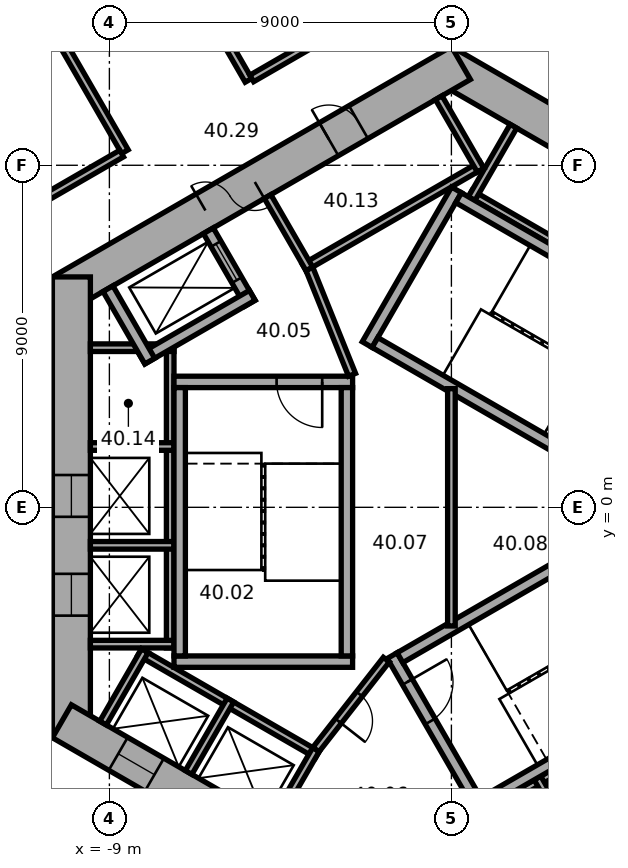
"""IFC4 building model, lengths in metres.
Left out: names, types, materials, properties, quantities, classifications, styles, units other than length and angle.
Written with IfcOpenShell. Run it as: python <this file> out.ifc"""

import sys

from ifc_helpers import new_model, si_unit, direction, frame, frame_2d, origin, place, context, subcontext, project, spatial, rectangle, extrude, element, fill, save


model = new_model("IFC4")
c1 = context("Model", 3, precision=1e-05, world=origin(), true_north=direction((0.0, 1.0)))
c2 = subcontext(c1, "Body", "Model", "MODEL_VIEW")
j1 = project(units=[si_unit("LENGTHUNIT", "METRE"), si_unit("PLANEANGLEUNIT", "RADIAN")], contexts=[c1])
p1 = place(None, origin())
s1 = spatial("IfcSite", under=j1, at=p1, CompositionType="ELEMENT")
p2 = place(p1, origin())
s2 = spatial("IfcBuilding", under=s1, at=p2, CompositionType="ELEMENT")
p3 = place(p2, frame((0.0, 0.0, 165.1)))
s3 = spatial("IfcBuildingStorey", under=s2, at=p3, CompositionType="ELEMENT", Elevation=165.1)
p4 = place(p3, frame((10.25, 5.629, 0.0), z_axis=(0.0, 0.0, 1.0), x_axis=(-0.866022616891, 0.50000482701, 0.0)))
e1 = element("IfcWall", 1, at=p4, inside=s3, PredefinedType="SHEAR", context=c2, shape_type="SweptSolid", body=[
    extrude(rectangle(XDim=12.125, YDim=1.0, at=frame_2d((6.062, 0.0))), origin(), (0.0, 0.0, 1.0), 3.7),
])
p5 = place(p4, frame((2.712, 0.0, 0.0)))
e2 = element("IfcOpeningElement", 2, at=p5, cuts=e1, PredefinedType="OPENING", context=c2, shape_type="SweptSolid", body=[
    extrude(rectangle(XDim=0.9, YDim=2.1, at=frame_2d((0.45, 1.05))), frame((0.0, 0.51, 0.0), z_axis=(0.0, -1.0, 0.0), x_axis=(1.0, 0.0, 0.0)), (0.0, 0.0, 1.0), 1.02),
])
p6 = place(p4, frame((6.612, 0.0, 0.0)))
e3 = element("IfcOpeningElement", 3, at=p6, cuts=e1, PredefinedType="OPENING", context=c2, shape_type="SweptSolid", body=[
    extrude(rectangle(XDim=0.9, YDim=2.1, at=frame_2d((0.45, 1.05))), frame((0.0, 0.51, 0.0), z_axis=(0.0, -1.0, 0.0), x_axis=(1.0, 0.0, 0.0)), (0.0, 0.0, 1.0), 1.02),
])
p7 = place(p3, frame((0.25, 11.691, 0.0), z_axis=(0.0, 0.0, 1.0), x_axis=(-0.866022616891, -0.50000482701, 0.0)))
e4 = element("IfcWall", 4, at=p7, inside=s3, PredefinedType="SHEAR", context=c2, shape_type="SweptSolid", body=[
    extrude(rectangle(XDim=12.125, YDim=1.0, at=frame_2d((6.062, 0.0))), origin(), (0.0, 0.0, 1.0), 3.7),
])
p8 = place(p7, frame((6.262, 0.0, 0.0)))
e5 = element("IfcOpeningElement", 5, at=p8, cuts=e4, PredefinedType="OPENING", context=c2, shape_type="SweptSolid", body=[
    extrude(rectangle(XDim=1.5, YDim=2.1, at=frame_2d((0.75, 1.05))), frame((0.0, 0.51, 0.0), z_axis=(0.0, -1.0, 0.0), x_axis=(1.0, 0.0, 0.0)), (0.0, 0.0, 1.0), 1.02),
])
p9 = place(p7, frame((3.112, 0.0, 0.0)))
e6 = element("IfcOpeningElement", 6, at=p9, cuts=e4, PredefinedType="OPENING", context=c2, shape_type="SweptSolid", body=[
    extrude(rectangle(XDim=0.9, YDim=2.1, at=frame_2d((0.45, 1.05))), frame((0.0, 0.51, 0.0), z_axis=(0.0, -1.0, 0.0), x_axis=(1.0, 0.0, 0.0)), (0.0, 0.0, 1.0), 1.02),
])
p10 = place(p3, frame((-10.0, 6.062, 0.0), z_axis=(0.0, 0.0, 1.0), x_axis=(0.0, -1.0, 0.0)))
e7 = element("IfcWall", 7, at=p10, inside=s3, PredefinedType="SHEAR", context=c2, shape_type="SweptSolid", body=[
    extrude(rectangle(XDim=12.125, YDim=1.0, at=frame_2d((6.062, 0.0))), origin(), (0.0, 0.0, 1.0), 3.7),
])
p11 = place(p10, frame((5.212, 0.0, 0.0)))
e8 = element("IfcOpeningElement", 8, at=p11, cuts=e7, PredefinedType="OPENING", context=c2, shape_type="SweptSolid", body=[
    extrude(rectangle(XDim=1.1, YDim=2.1, at=frame_2d((0.55, 1.05))), frame((0.0, 0.51, 0.0), z_axis=(0.0, -1.0, 0.0), x_axis=(1.0, 0.0, 0.0)), (0.0, 0.0, 1.0), 1.02),
])
p12 = place(p10, frame((7.812, 0.0, 0.0)))
e9 = element("IfcOpeningElement", 9, at=p12, cuts=e7, PredefinedType="OPENING", context=c2, shape_type="SweptSolid", body=[
    extrude(rectangle(XDim=1.1, YDim=2.1, at=frame_2d((0.55, 1.05))), frame((0.0, 0.51, 0.0), z_axis=(0.0, -1.0, 0.0), x_axis=(1.0, 0.0, 0.0)), (0.0, 0.0, 1.0), 1.02),
])
p13 = place(p3, frame((-10.25, -5.629, 0.0), z_axis=(0.0, 0.0, 1.0), x_axis=(0.866022616891, -0.50000482701, 0.0)))
e10 = element("IfcWall", 10, at=p13, inside=s3, PredefinedType="SHEAR", context=c2, shape_type="SweptSolid", body=[
    extrude(rectangle(XDim=12.125, YDim=1.0, at=frame_2d((6.062, 0.0))), origin(), (0.0, 0.0, 1.0), 3.7),
])
p14 = place(p13, frame((6.262, 0.0, 0.0)))
e11 = element("IfcOpeningElement", 11, at=p14, cuts=e10, PredefinedType="OPENING", context=c2, shape_type="SweptSolid", body=[
    extrude(rectangle(XDim=1.5, YDim=2.1, at=frame_2d((0.75, 1.05))), frame((0.0, 0.51, 0.0), z_axis=(0.0, -1.0, 0.0), x_axis=(1.0, 0.0, 0.0)), (0.0, 0.0, 1.0), 1.02),
])
p15 = place(p13, frame((1.712, 0.0, 0.0)))
e12 = element("IfcOpeningElement", 12, at=p15, cuts=e10, PredefinedType="OPENING", context=c2, shape_type="SweptSolid", body=[
    extrude(rectangle(XDim=1.1, YDim=2.1, at=frame_2d((0.55, 1.05))), frame((0.0, 0.51, 0.0), z_axis=(0.0, -1.0, 0.0), x_axis=(1.0, 0.0, 0.0)), (0.0, 0.0, 1.0), 1.02),
])
p16 = place(p13, frame((4.312, 0.0, 0.0)))
e13 = element("IfcOpeningElement", 13, at=p16, cuts=e10, PredefinedType="OPENING", context=c2, shape_type="SweptSolid", body=[
    extrude(rectangle(XDim=1.1, YDim=2.1, at=frame_2d((0.55, 1.05))), frame((0.0, 0.51, 0.0), z_axis=(0.0, -1.0, 0.0), x_axis=(1.0, 0.0, 0.0)), (0.0, 0.0, 1.0), 1.02),
])
p17 = place(p3, frame((-0.25, -11.691, 0.0), z_axis=(0.0, 0.0, 1.0), x_axis=(0.866022616891, 0.50000482701, 0.0)))
e14 = element("IfcWall", 14, at=p17, inside=s3, PredefinedType="SHEAR", context=c2, shape_type="SweptSolid", body=[
    extrude(rectangle(XDim=12.125, YDim=1.0, at=frame_2d((6.062, 0.0))), origin(), (0.0, 0.0, 1.0), 3.7),
])
p18 = place(p17, frame((2.612, 0.0, 0.0)))
e15 = element("IfcOpeningElement", 15, at=p18, cuts=e14, PredefinedType="OPENING", context=c2, shape_type="SweptSolid", body=[
    extrude(rectangle(XDim=1.1, YDim=2.1, at=frame_2d((0.55, 1.05))), frame((0.0, 0.51, 0.0), z_axis=(0.0, -1.0, 0.0), x_axis=(1.0, 0.0, 0.0)), (0.0, 0.0, 1.0), 1.02),
])
p19 = place(p17, frame((5.212, 0.0, 0.0)))
e16 = element("IfcOpeningElement", 16, at=p19, cuts=e14, PredefinedType="OPENING", context=c2, shape_type="SweptSolid", body=[
    extrude(rectangle(XDim=1.1, YDim=2.1, at=frame_2d((0.55, 1.05))), frame((0.0, 0.51, 0.0), z_axis=(0.0, -1.0, 0.0), x_axis=(1.0, 0.0, 0.0)), (0.0, 0.0, 1.0), 1.02),
])
p20 = place(p17, frame((7.812, 0.0, 0.0)))
e17 = element("IfcOpeningElement", 17, at=p20, cuts=e14, PredefinedType="OPENING", context=c2, shape_type="SweptSolid", body=[
    extrude(rectangle(XDim=1.1, YDim=2.1, at=frame_2d((0.55, 1.05))), frame((0.0, 0.51, 0.0), z_axis=(0.0, -1.0, 0.0), x_axis=(1.0, 0.0, 0.0)), (0.0, 0.0, 1.0), 1.02),
])
p21 = place(p3, frame((7.424, 4.259, 0.0), z_axis=(0.0, 0.0, 1.0), x_axis=(-0.866026010844, 0.49999894854, 0.0)))
e18 = element("IfcWall", 18, at=p21, inside=s3, PredefinedType="PARTITIONING", context=c2, shape_type="SweptSolid", body=[
    extrude(rectangle(XDim=8.0, YDim=0.2, at=frame_2d((4.0, 0.0))), origin(), (0.0, 0.0, 1.0), 3.42),
])
p22 = place(p3, frame((0.532, 8.122, 0.0), z_axis=(0.0, 0.0, 1.0), x_axis=(0.500077893725, 0.86598042715, 0.0)))
e19 = element("IfcWall", 19, at=p22, inside=s3, PredefinedType="PARTITIONING", context=c2, shape_type="SweptSolid", body=[
    extrude(rectangle(XDim=2.2, YDim=0.2, at=frame_2d((1.1, 0.0))), origin(), (0.0, 0.0, 1.0), 3.42),
])
p23 = place(p3, frame((0.803, 9.009, 0.0), z_axis=(0.0, 0.0, 1.0), x_axis=(-0.866028230842, -0.499995103361, 0.0)))
e20 = element("IfcWall", 20, at=p23, inside=s3, PredefinedType="PARTITIONING", context=c2, shape_type="SweptSolid", body=[
    extrude(rectangle(XDim=5.4, YDim=0.2, at=frame_2d((2.7, 0.0))), origin(), (0.0, 0.0, 1.0), 3.42),
])
p24 = place(p3, frame((0.767, 8.872, 0.0), z_axis=(0.0, 0.0, 1.0), x_axis=(-0.499994660107, 0.866028486751, 0.0)))
e21 = element("IfcWall", 21, at=p24, inside=s3, PredefinedType="PARTITIONING", context=c2, shape_type="SweptSolid", body=[
    extrude(rectangle(XDim=2.2, YDim=0.2, at=frame_2d((1.1, 0.0))), origin(), (0.0, 0.0, 1.0), 3.42),
])
p25 = place(p3, frame((-3.737, 6.272, 0.0), z_axis=(0.0, 0.0, 1.0), x_axis=(-0.50002983664, 0.866008176907, 0.0)))
e22 = element("IfcWall", 22, at=p25, inside=s3, PredefinedType="PARTITIONING", context=c2, shape_type="SweptSolid", body=[
    extrude(rectangle(XDim=2.2, YDim=0.2, at=frame_2d((1.1, 0.0))), origin(), (0.0, 0.0, 1.0), 3.42),
])
p26 = place(p3, frame((-7.4, 4.3, 0.0), z_axis=(0.0, 0.0, 1.0), x_axis=(0.0, -1.0, 0.0)))
e23 = element("IfcWall", 23, at=p26, inside=s3, PredefinedType="PARTITIONING", context=c2, shape_type="SweptSolid", body=[
    extrude(rectangle(XDim=8.0, YDim=0.2, at=frame_2d((4.0, 0.0))), origin(), (0.0, 0.0, 1.0), 3.42),
])
for number, where, z_axis, x_axis in (
    (24, (-7.3, 4.2, 0.0), (0.0, 0.0, 1.0), (-1.0, 0.0, 0.0)),
    (25, (-7.3, 1.6, 0.0), (0.0, 0.0, 1.0), (-1.0, 0.0, 0.0)),
    (26, (-7.3, -1.0, 0.0), (0.0, 0.0, 1.0), (-1.0, 0.0, 0.0)),
    (27, (-7.3, -3.6, 0.0), (0.0, 0.0, 1.0), (-1.0, 0.0, 0.0)),
):
    element("IfcWall", number, at=place(p3, frame(where, z_axis=z_axis, x_axis=x_axis)), inside=s3, PredefinedType="PARTITIONING", context=c2, shape_type="SweptSolid", body=[
        extrude(rectangle(XDim=2.2, YDim=0.2, at=frame_2d((1.1, 0.0))), origin(), (0.0, 0.0, 1.0), 3.42),
    ])
p27 = place(p3, frame((-8.203, -3.809, 0.0), z_axis=(0.0, 0.0, 1.0), x_axis=(0.866028230842, -0.499995103361, 0.0)))
e28 = element("IfcWall", 28, at=p27, inside=s3, PredefinedType="PARTITIONING", context=c2, shape_type="SweptSolid", body=[
    extrude(rectangle(XDim=5.4, YDim=0.2, at=frame_2d((2.7, 0.0))), origin(), (0.0, 0.0, 1.0), 3.42),
])
for number, where, z_axis, x_axis in (
    (29, (-8.067, -3.772, 0.0), (0.0, 0.0, 1.0), (-0.5, -0.866, 0.0)),
    (30, (-5.815, -5.072, 0.0), (0.0, 0.0, 1.0), (-0.5, -0.866, 0.0)),
):
    element("IfcWall", number, at=place(p3, frame(where, z_axis=z_axis, x_axis=x_axis)), inside=s3, PredefinedType="PARTITIONING", context=c2, shape_type="SweptSolid", body=[
        extrude(rectangle(XDim=2.2, YDim=0.2, at=frame_2d((1.1, 0.0))), origin(), (0.0, 0.0, 1.0), 3.42),
    ])
p28 = place(p3, frame((-3.563, -6.372, 0.0), z_axis=(0.0, 0.0, 1.0), x_axis=(-0.499994660107, -0.866028486751, 0.0)))
e31 = element("IfcWall", 31, at=p28, inside=s3, PredefinedType="PARTITIONING", context=c2, shape_type="SweptSolid", body=[
    extrude(rectangle(XDim=2.2, YDim=0.2, at=frame_2d((1.1, 0.0))), origin(), (0.0, 0.0, 1.0), 3.42),
])
p29 = place(p3, frame((-0.024, -8.559, 0.0), z_axis=(0.0, 0.0, 1.0), x_axis=(0.866026010844, 0.49999894854, 0.0)))
e32 = element("IfcWall", 32, at=p29, inside=s3, PredefinedType="PARTITIONING", context=c2, shape_type="SweptSolid", body=[
    extrude(rectangle(XDim=8.0, YDim=0.2, at=frame_2d((4.0, 0.0))), origin(), (0.0, 0.0, 1.0), 3.42),
])
p30 = place(p3, frame((2.264, -7.122, 0.0), z_axis=(0.0, 0.0, 1.0), x_axis=(0.500077893725, -0.86598042715, 0.0)))
e33 = element("IfcWall", 33, at=p30, inside=s3, PredefinedType="PARTITIONING", context=c2, shape_type="SweptSolid", body=[
    extrude(rectangle(XDim=2.2, YDim=0.2, at=frame_2d((1.1, 0.0))), origin(), (0.0, 0.0, 1.0), 3.42),
])
p31 = place(p3, frame((-2.216, 4.282, 0.0), z_axis=(0.0, 0.0, 1.0), x_axis=(0.499977259774, 0.866038532462, 0.0)))
e34 = element("IfcWall", 34, at=p31, inside=s3, PredefinedType="SHEAR", context=c2, shape_type="SweptSolid", body=[
    extrude(rectangle(XDim=4.7, YDim=0.3, at=frame_2d((2.35, 0.0))), origin(), (0.0, 0.0, 1.0), 3.42),
])
for number, where, z_axis, x_axis in (
    (35, (4.103, 0.807, 0.0), (0.0, 0.0, 1.0), (-0.866, 0.5, 0.0)),
    (36, (6.303, 4.617, 0.0), (0.0, 0.0, 1.0), (-0.866, 0.5, 0.0)),
):
    element("IfcWall", number, at=place(p3, frame(where, z_axis=z_axis, x_axis=x_axis)), inside=s3, PredefinedType="SHEAR", context=c2, shape_type="SweptSolid", body=[
        extrude(rectangle(XDim=7.06, YDim=0.3, at=frame_2d((3.53, 0.0))), origin(), (0.0, 0.0, 1.0), 3.42),
    ])
p32 = place(p3, frame((-2.6, 3.3, 0.0), z_axis=(0.0, 0.0, 1.0), x_axis=(-1.0, 0.0, 0.0)))
e37 = element("IfcWall", 37, at=p32, inside=s3, PredefinedType="SHEAR", context=c2, shape_type="SweptSolid", body=[
    extrude(rectangle(XDim=4.7, YDim=0.3, at=frame_2d((2.35, 0.0))), origin(), (0.0, 0.0, 1.0), 3.42),
])
p33 = place(p32, frame((0.8, 0.0, 0.0)))
e38 = element("IfcOpeningElement", 38, at=p33, cuts=e37, PredefinedType="OPENING", context=c2, shape_type="SweptSolid", body=[
    extrude(rectangle(XDim=1.2, YDim=2.1, at=frame_2d((0.6, 1.05))), frame((0.0, 0.16, 0.0), z_axis=(0.0, -1.0, 0.0), x_axis=(1.0, 0.0, 0.0)), (0.0, 0.0, 1.0), 0.32),
])
p34 = place(p3, frame((-2.6, -4.06, 0.0), z_axis=(0.0, 0.0, 1.0), x_axis=(-1.0, 0.0, 0.0)))
e39 = element("IfcWall", 39, at=p34, inside=s3, PredefinedType="SHEAR", context=c2, shape_type="SweptSolid", body=[
    extrude(rectangle(XDim=4.7, YDim=0.3, at=frame_2d((2.35, 0.0))), origin(), (0.0, 0.0, 1.0), 3.42),
])
for number, where, z_axis, x_axis in (
    (40, (-2.75, 3.15, 0.0), (0.0, 0.0, 1.0), (0.0, -1.0, 0.0)),
    (41, (-7.15, 3.15, 0.0), (0.0, 0.0, 1.0), (0.0, -1.0, 0.0)),
):
    element("IfcWall", number, at=place(p3, frame(where, z_axis=z_axis, x_axis=x_axis)), inside=s3, PredefinedType="SHEAR", context=c2, shape_type="SweptSolid", body=[
        extrude(rectangle(XDim=7.06, YDim=0.3, at=frame_2d((3.53, 0.0))), origin(), (0.0, 0.0, 1.0), 3.42),
    ])
p35 = place(p3, frame((-1.558, -3.902, 0.0), z_axis=(0.0, 0.0, 1.0), x_axis=(0.499977259774, -0.866038532462, 0.0)))
e42 = element("IfcWall", 42, at=p35, inside=s3, PredefinedType="SHEAR", context=c2, shape_type="SweptSolid", body=[
    extrude(rectangle(XDim=4.7, YDim=0.3, at=frame_2d((2.35, 0.0))), origin(), (0.0, 0.0, 1.0), 3.42),
])
p36 = place(p35, frame((0.8, 0.0, 0.0)))
e43 = element("IfcOpeningElement", 43, at=p36, cuts=e42, PredefinedType="OPENING", context=c2, shape_type="SweptSolid", body=[
    extrude(rectangle(XDim=1.2, YDim=2.1, at=frame_2d((0.6, 1.05))), frame((0.0, 0.16, 0.0), z_axis=(0.0, -1.0, 0.0), x_axis=(1.0, 0.0, 0.0)), (0.0, 0.0, 1.0), 0.32),
])
for number, where, z_axis, x_axis in (
    (44, (-1.353, -3.957, 0.0), (0.0, 0.0, 1.0), (0.866, 0.5, 0.0)),
    (45, (0.847, -7.767, 0.0), (0.0, 0.0, 1.0), (0.866, 0.5, 0.0)),
):
    element("IfcWall", number, at=place(p3, frame(where, z_axis=z_axis, x_axis=x_axis)), inside=s3, PredefinedType="SHEAR", context=c2, shape_type="SweptSolid", body=[
        extrude(rectangle(XDim=7.06, YDim=0.3, at=frame_2d((3.53, 0.0))), origin(), (0.0, 0.0, 1.0), 3.42),
    ])
p37 = place(p3, frame((-5.295, 5.372, 0.0), z_axis=(0.0, 0.0, 1.0), x_axis=(-0.500077893725, 0.86598042715, 0.0)))
e46 = element("IfcWall", 46, at=p37, inside=s3, PredefinedType="SHEAR", context=c2, shape_type="SweptSolid", body=[
    extrude(rectangle(XDim=2.2, YDim=0.3, at=frame_2d((1.1, 0.0))), origin(), (0.0, 0.0, 1.0), 3.42),
])
p38 = place(p37, frame((0.7, 0.0, 0.0)))
e47 = element("IfcOpeningElement", 47, at=p38, cuts=e46, PredefinedType="OPENING", context=c2, shape_type="SweptSolid", body=[
    extrude(rectangle(XDim=1.1, YDim=2.1, at=frame_2d((0.55, 1.05))), frame((0.0, 0.16, 0.0), z_axis=(0.0, -1.0, 0.0), x_axis=(1.0, 0.0, 0.0)), (0.0, 0.0, 1.0), 0.32),
])
p39 = place(p3, frame((-5.24, 5.577, 0.0), z_axis=(0.0, 0.0, 1.0), x_axis=(-0.866014461049, -0.500018952895, 0.0)))
e48 = element("IfcWall", 48, at=p39, inside=s3, PredefinedType="SHEAR", context=c2, shape_type="SweptSolid", body=[
    extrude(rectangle(XDim=3.35, YDim=0.3, at=frame_2d((1.675, 0.0))), origin(), (0.0, 0.0, 1.0), 3.42),
])
p40 = place(p3, frame((-7.937, 3.847, 0.0), z_axis=(0.0, 0.0, 1.0), x_axis=(-0.50002983664, 0.866008176907, 0.0)))
e49 = element("IfcWall", 49, at=p40, inside=s3, PredefinedType="SHEAR", context=c2, shape_type="SweptSolid", body=[
    extrude(rectangle(XDim=2.2, YDim=0.3, at=frame_2d((1.1, 0.0))), origin(), (0.0, 0.0, 1.0), 3.42),
])
p41 = place(p3, frame((-2.615, 3.487, 0.0), z_axis=(0.0, 0.0, 1.0), x_axis=(-0.373576831041, 0.92759924068, 0.0)))
e50 = element("IfcWall", 50, at=p41, inside=s3, PredefinedType="PARTITIONING", context=c2, shape_type="SweptSolid", body=[
    extrude(rectangle(XDim=3.002, YDim=0.2, at=frame_2d((1.501, 0.0))), origin(), (0.0, 0.0, 1.0), 3.42),
])
p42 = place(p3, frame((-1.712, -4.008, 0.0), z_axis=(0.0, 0.0, 1.0), x_axis=(-0.616549420702, -0.787316208287, 0.0)))
e51 = element("IfcWall", 51, at=p42, inside=s3, PredefinedType="PARTITIONING", context=c2, shape_type="SweptSolid", body=[
    extrude(rectangle(XDim=3.002, YDim=0.2, at=frame_2d((1.501, 0.0))), origin(), (0.0, 0.0, 1.0), 3.42),
])
p43 = place(p42, frame((1.15, 0.0, 0.0)))
e52 = element("IfcOpeningElement", 52, at=p43, cuts=e51, PredefinedType="OPENING", context=c2, shape_type="SweptSolid", body=[
    extrude(rectangle(XDim=0.9, YDim=2.1, at=frame_2d((0.45, 1.05))), frame((0.0, 0.11, 0.0), z_axis=(0.0, -1.0, 0.0), x_axis=(1.0, 0.0, 0.0)), (0.0, 0.0, 1.0), 0.22),
])
p44 = place(p3, frame((0.0, -3.122, 0.0), z_axis=(0.0, 0.0, 1.0), x_axis=(0.0, 1.0, 0.0)))
e53 = element("IfcWall", 53, at=p44, inside=s3, PredefinedType="PARTITIONING", context=c2, shape_type="SweptSolid", body=[
    extrude(rectangle(XDim=6.245, YDim=0.2, at=frame_2d((3.122, 0.0))), origin(), (0.0, 0.0, 1.0), 3.42),
])
p45 = place(p3, frame((-12.766, 16.589, 0.0), z_axis=(0.0, 0.0, 1.0), x_axis=(0.500010139422, -0.866019549707, 0.0)))
e54 = element("IfcWall", 54, at=p45, inside=s3, PredefinedType="PARTITIONING", context=c2, shape_type="SweptSolid", body=[
    extrude(rectangle(XDim=8.35, YDim=0.2, at=frame_2d((4.175, 0.0))), origin(), (0.0, 0.0, 1.0), 3.42),
])
p46 = place(p45, frame((3.675, 0.0, 0.0)))
e55 = element("IfcOpeningElement", 55, at=p46, cuts=e54, PredefinedType="OPENING", context=c2, shape_type="SweptSolid", body=[
    extrude(rectangle(XDim=1.0, YDim=2.1, at=frame_2d((0.5, 1.05))), frame((0.0, 0.11, 0.0), z_axis=(0.0, -1.0, 0.0), x_axis=(1.0, 0.0, 0.0)), (0.0, 0.0, 1.0), 0.22),
])
p47 = place(p3, frame((-9.515, 18.466, 0.0), z_axis=(0.0, 0.0, 1.0), x_axis=(0.500010139422, -0.866019549707, 0.0)))
e56 = element("IfcWall", 56, at=p47, inside=s3, PredefinedType="PARTITIONING", context=c2, shape_type="SweptSolid", body=[
    extrude(rectangle(XDim=8.35, YDim=0.2, at=frame_2d((4.175, 0.0))), origin(), (0.0, 0.0, 1.0), 2.87),
])
p48 = place(p47, frame((3.675, 0.0, 0.0)))
e57 = element("IfcOpeningElement", 57, at=p48, cuts=e56, PredefinedType="OPENING", context=c2, shape_type="SweptSolid", body=[
    extrude(rectangle(XDim=1.0, YDim=2.1, at=frame_2d((0.5, 1.05))), frame((0.0, 0.11, 0.0), z_axis=(0.0, -1.0, 0.0), x_axis=(1.0, 0.0, 0.0)), (0.0, 0.0, 1.0), 0.22),
])
p49 = place(p3, frame((-8.678, 9.308, 0.0), z_axis=(0.0, 0.0, 1.0), x_axis=(-0.866000359435, -0.500043375578, 0.0)))
e58 = element("IfcWall", 58, at=p49, inside=s3, PredefinedType="PARTITIONING", context=c2, shape_type="SweptSolid", body=[
    extrude(rectangle(XDim=3.161, YDim=0.2, at=frame_2d((1.581, 0.0))), origin(), (0.0, 0.0, 1.0), 3.42),
])
p50 = place(p3, frame((-0.95, 13.77, 0.0), z_axis=(0.0, 0.0, 1.0), x_axis=(-0.866036689987, -0.499980451214, 0.0)))
e59 = element("IfcWall", 59, at=p50, inside=s3, PredefinedType="PARTITIONING", context=c2, shape_type="SweptSolid", body=[
    extrude(rectangle(XDim=4.969, YDim=0.2, at=frame_2d((2.485, 0.0))), origin(), (0.0, 0.0, 1.0), 3.42),
])
p51 = place(p3, frame((9.224, 8.993, 0.0), z_axis=(0.0, 0.0, 1.0), x_axis=(-0.866031754707, 0.499988999718, 0.0)))
e60 = element("IfcWall", 60, at=p51, inside=s3, PredefinedType="PARTITIONING", context=c2, shape_type="SweptSolid", body=[
    extrude(rectangle(XDim=9.514, YDim=0.2, at=frame_2d((4.757, 0.0))), origin(), (0.0, 0.0, 1.0), 3.42),
])
p52 = place(p51, frame((3.848, 0.0, 0.0)))
e61 = element("IfcOpeningElement", 61, at=p52, cuts=e60, PredefinedType="OPENING", context=c2, shape_type="SweptSolid", body=[
    extrude(rectangle(XDim=1.0, YDim=2.1, at=frame_2d((0.5, 1.05))), frame((0.0, 0.11, 0.0), z_axis=(0.0, -1.0, 0.0), x_axis=(1.0, 0.0, 0.0)), (0.0, 0.0, 1.0), 0.22),
])
p53 = place(p8, origin())
e62 = element("IfcDoor", 62, at=p53, inside=s3, OperationType="DOUBLE_DOOR_SINGLE_SWING", PredefinedType="DOOR", context=c2, shape_type="SweptSolid", body=[
    extrude(rectangle(XDim=1.5, YDim=2.1, at=frame_2d((0.75, 1.05))), frame((0.0, 0.025, 0.0), z_axis=(0.0, -1.0, 0.0), x_axis=(1.0, 0.0, 0.0)), (0.0, 0.0, 1.0), 0.05),
])
fill(e5, e62)
p54 = place(p33, origin())
e63 = element("IfcDoor", 63, at=p54, inside=s3, OperationType="SINGLE_SWING_RIGHT", PredefinedType="DOOR", context=c2, shape_type="SweptSolid", body=[
    extrude(rectangle(XDim=1.2, YDim=2.1, at=frame_2d((0.6, 1.05))), frame((0.0, 0.025, 0.0), z_axis=(0.0, -1.0, 0.0), x_axis=(1.0, 0.0, 0.0)), (0.0, 0.0, 1.0), 0.05),
])
fill(e38, e63)
p55 = place(p36, origin())
e64 = element("IfcDoor", 64, at=p55, inside=s3, OperationType="SINGLE_SWING_RIGHT", PredefinedType="DOOR", context=c2, shape_type="SweptSolid", body=[
    extrude(rectangle(XDim=1.2, YDim=2.1, at=frame_2d((0.6, 1.05))), frame((0.0, 0.025, 0.0), z_axis=(0.0, -1.0, 0.0), x_axis=(1.0, 0.0, 0.0)), (0.0, 0.0, 1.0), 0.05),
])
fill(e43, e64)
p56 = place(p43, origin())
e65 = element("IfcDoor", 65, at=p56, inside=s3, OperationType="SINGLE_SWING_LEFT", PredefinedType="DOOR", context=c2, shape_type="SweptSolid", body=[
    extrude(rectangle(XDim=0.9, YDim=2.1, at=frame_2d((0.45, 1.05))), frame((0.0, 0.025, 0.0), z_axis=(0.0, -1.0, 0.0), x_axis=(1.0, 0.0, 0.0)), (0.0, 0.0, 1.0), 0.05),
])
fill(e52, e65)
p57 = place(p9, origin())
e66 = element("IfcDoor", 66, at=p57, inside=s3, OperationType="SINGLE_SWING_LEFT", PredefinedType="DOOR", context=c2, shape_type="SweptSolid", body=[
    extrude(rectangle(XDim=0.9, YDim=2.1, at=frame_2d((0.45, 1.05))), frame((0.0, 0.025, 0.0), z_axis=(0.0, -1.0, 0.0), x_axis=(1.0, 0.0, 0.0)), (0.0, 0.0, 1.0), 0.05),
])
fill(e6, e66)
p58 = place(p38, origin())
e67 = element("IfcDoor", 67, at=p58, inside=s3, OperationType="DOUBLE_DOOR_SLIDING", PredefinedType="DOOR", context=c2, shape_type="SweptSolid", body=[
    extrude(rectangle(XDim=1.1, YDim=2.1, at=frame_2d((0.55, 1.05))), frame((0.0, 0.025, 0.0), z_axis=(0.0, -1.0, 0.0), x_axis=(1.0, 0.0, 0.0)), (0.0, 0.0, 1.0), 0.05),
])
fill(e47, e67)
p59 = place(p11, origin())
e68 = element("IfcDoor", 68, at=p59, inside=s3, OperationType="DOUBLE_DOOR_SLIDING", PredefinedType="DOOR", context=c2, shape_type="SweptSolid", body=[
    extrude(rectangle(XDim=1.1, YDim=2.1, at=frame_2d((0.55, 1.05))), frame((0.0, 0.025, 0.0), z_axis=(0.0, -1.0, 0.0), x_axis=(1.0, 0.0, 0.0)), (0.0, 0.0, 1.0), 0.05),
])
fill(e8, e68)
p60 = place(p12, origin())
e69 = element("IfcDoor", 69, at=p60, inside=s3, OperationType="DOUBLE_DOOR_SLIDING", PredefinedType="DOOR", context=c2, shape_type="SweptSolid", body=[
    extrude(rectangle(XDim=1.1, YDim=2.1, at=frame_2d((0.55, 1.05))), frame((0.0, 0.025, 0.0), z_axis=(0.0, -1.0, 0.0), x_axis=(1.0, 0.0, 0.0)), (0.0, 0.0, 1.0), 0.05),
])
fill(e9, e69)
p61 = place(p15, origin())
e70 = element("IfcDoor", 70, at=p61, inside=s3, OperationType="DOUBLE_DOOR_SLIDING", PredefinedType="DOOR", context=c2, shape_type="SweptSolid", body=[
    extrude(rectangle(XDim=1.1, YDim=2.1, at=frame_2d((0.55, 1.05))), frame((0.0, 0.025, 0.0), z_axis=(0.0, -1.0, 0.0), x_axis=(1.0, 0.0, 0.0)), (0.0, 0.0, 1.0), 0.05),
])
fill(e12, e70)
save(model, sys.argv[1])
